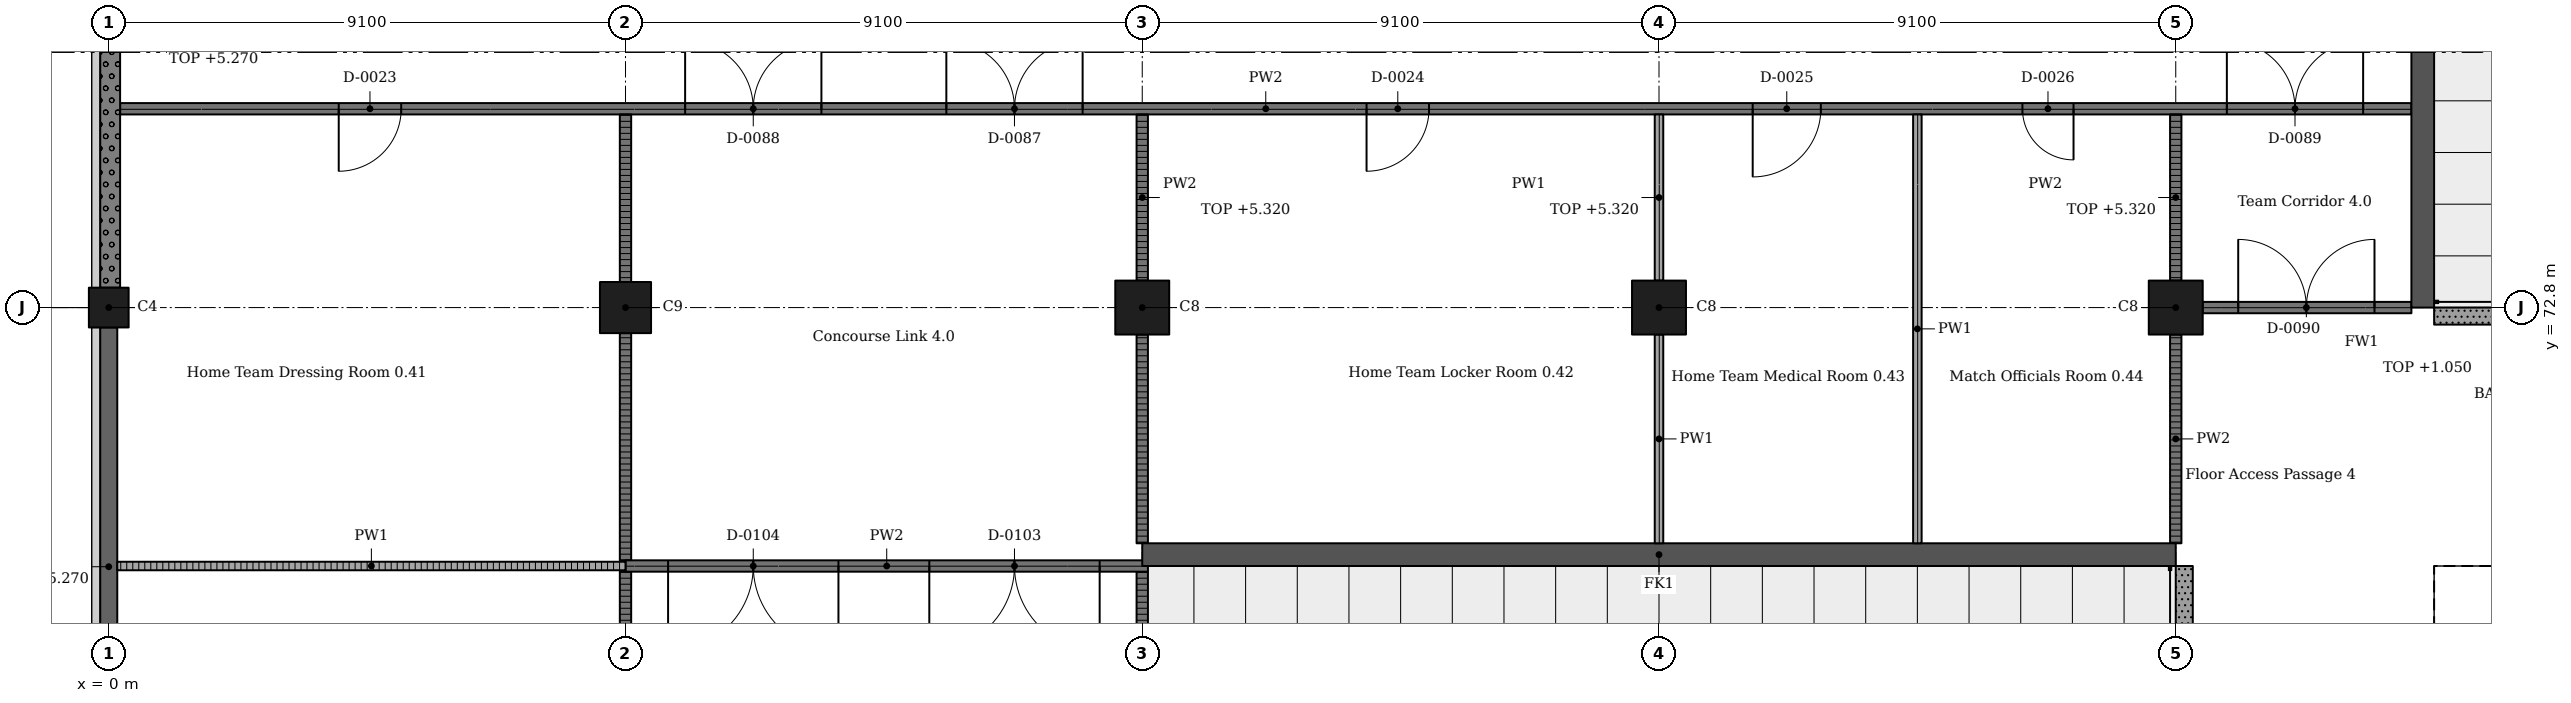
"""IFC4 building model, lengths in metres.
Left out: names, types, materials, properties, quantities, classifications, styles, units other than length and angle.
Written with IfcOpenShell. Run it as: python <this file> out.ifc"""

import sys

from ifc_helpers import new_model, si_unit, direction, frame, frame_2d, origin, origin_2d, place, context, subcontext, project, spatial, rectangle, extrude, element, fill, save


model = new_model("IFC4")
c1 = context("Model", 3, precision=1e-05, world=origin(), true_north=direction((0.0, 1.0)))
c2 = subcontext(c1, "Body", "Model", "MODEL_VIEW")
j1 = project(units=[si_unit("LENGTHUNIT", "METRE"), si_unit("PLANEANGLEUNIT", "RADIAN")], contexts=[c1])
p1 = place(None, origin())
s1 = spatial("IfcSite", under=j1, at=p1, CompositionType="ELEMENT")
p2 = place(p1, origin())
s2 = spatial("IfcBuilding", under=s1, at=p2, CompositionType="ELEMENT")
p3 = place(p2, origin())
s3 = spatial("IfcBuildingStorey", under=s2, at=p3, CompositionType="ELEMENT", Elevation=0.0)
p4 = place(p3, frame((0.0, 72.8, -0.4), z_axis=(0.0, 0.0, 1.0), x_axis=(1.0, 0.0, 0.0)))
e1 = element("IfcColumn", 1, at=p4, inside=s3, PredefinedType="COLUMN", context=c2, shape_type="SweptSolid", body=[
    extrude(rectangle(XDim=0.7, YDim=0.7, at=origin_2d()), origin(), (0.0, 0.0, 1.0), 6.77),
])
p5 = place(p3, frame((9.1, 72.8, -0.4), z_axis=(0.0, 0.0, 1.0), x_axis=(1.0, 0.0, 0.0)))
e2 = element("IfcColumn", 2, at=p5, inside=s3, PredefinedType="COLUMN", context=c2, shape_type="SweptSolid", body=[
    extrude(rectangle(XDim=0.9, YDim=0.9, at=origin_2d()), origin(), (0.0, 0.0, 1.0), 6.77),
])
for number, where, z_axis, x_axis in (
    (3, (18.2, 72.8, -0.4), (0.0, 0.0, 1.0), (1.0, 0.0, 0.0)),
    (4, (27.3, 72.8, -0.4), (0.0, 0.0, 1.0), (1.0, 0.0, 0.0)),
    (5, (36.4, 72.8, -0.4), (0.0, 0.0, 1.0), (1.0, 0.0, 0.0)),
):
    element("IfcColumn", number, at=place(p3, frame(where, z_axis=z_axis, x_axis=x_axis)), inside=s3, PredefinedType="COLUMN", context=c2, shape_type="SweptSolid", body=[
        extrude(rectangle(XDim=0.95, YDim=0.95, at=origin_2d()), origin(), (0.0, 0.0, 1.0), 6.77),
    ])
p6 = place(p3, frame((40.95, 72.65, -0.4), z_axis=(0.0, 0.0, 1.0), x_axis=(1.0, 0.0, 0.0)))
e6 = element("IfcWall", 6, at=p6, inside=s3, PredefinedType="SOLIDWALL", context=c2, shape_type="SweptSolid", body=[
    extrude(rectangle(XDim=63.7, YDim=0.3, at=frame_2d((31.85, 0.0))), origin(), (0.0, 0.0, 1.0), 1.45),
])
p7 = place(p3, frame((36.55, 40.95, -0.4), z_axis=(0.0, 0.0, 1.0), x_axis=(0.0, 1.0, 0.0)))
e7 = element("IfcWall", 7, at=p7, inside=s3, PredefinedType="SOLIDWALL", context=c2, shape_type="SweptSolid", body=[
    extrude(rectangle(XDim=27.3, YDim=0.3, at=frame_2d((13.65, 0.0))), origin(), (0.0, 0.0, 1.0), 1.45),
])
for number, where, z_axis, x_axis in (
    (8, (40.75, 72.8, -0.4), (0.0, 0.0, 1.0), (0.0, 1.0, 0.0)),
    (9, (36.4, 68.45, -0.4), (0.0, 0.0, 1.0), (-1.0, 0.0, 0.0)),
):
    element("IfcWall", number, at=place(p3, frame(where, z_axis=z_axis, x_axis=x_axis)), inside=s3, PredefinedType="SHEAR", context=c2, shape_type="SweptSolid", body=[
        extrude(rectangle(XDim=18.2, YDim=0.4, at=frame_2d((9.1, 0.0))), origin(), (0.0, 0.0, 1.0), 6.77),
    ])
p8 = place(p3, frame((0.025, 81.65, 0.0), z_axis=(0.0, 0.0, 1.0), x_axis=(0.0, -1.0, 0.0)))
e10 = element("IfcWall", 10, at=p8, inside=s3, PredefinedType="SOLIDWALL", context=c2, shape_type="SweptSolid", body=[
    extrude(rectangle(XDim=8.5, YDim=0.35, at=frame_2d((4.25, 0.0))), origin(), (0.0, 0.0, 1.0), 5.27),
])
p9 = place(p3, frame((0.0, 72.45, 0.0), z_axis=(0.0, 0.0, 1.0), x_axis=(0.0, -1.0, 0.0)))
e11 = element("IfcWall", 11, at=p9, inside=s3, PredefinedType="SOLIDWALL", context=c2, shape_type="SweptSolid", body=[
    extrude(rectangle(XDim=8.425, YDim=0.3, at=frame_2d((4.212, 0.0))), origin(), (0.0, 0.0, 1.0), 5.27),
])
p10 = place(p3, frame((0.2, 76.3, 0.0), z_axis=(0.0, 0.0, 1.0), x_axis=(1.0, 0.0, 0.0)))
e12 = element("IfcWall", 12, at=p10, inside=s3, PredefinedType="PARTITIONING", context=c2, shape_type="SweptSolid", body=[
    extrude(rectangle(XDim=40.35, YDim=0.2, at=frame_2d((20.175, 0.0))), origin(), (0.0, 0.0, 1.0), 6.02),
])
p11 = place(p10, frame((3.85, 0.0, 0.0)))
e13 = element("IfcOpeningElement", 13, at=p11, cuts=e12, PredefinedType="OPENING", context=c2, shape_type="SweptSolid", body=[
    extrude(rectangle(XDim=1.1, YDim=2.1, at=frame_2d((0.55, 1.05))), frame((0.0, 0.11, 0.0), z_axis=(0.0, -1.0, 0.0), x_axis=(1.0, 0.0, 0.0)), (0.0, 0.0, 1.0), 0.22),
])
p12 = place(p10, frame((21.95, 0.0, 0.0)))
e14 = element("IfcOpeningElement", 14, at=p12, cuts=e12, PredefinedType="OPENING", context=c2, shape_type="SweptSolid", body=[
    extrude(rectangle(XDim=1.1, YDim=2.1, at=frame_2d((0.55, 1.05))), frame((0.0, 0.11, 0.0), z_axis=(0.0, -1.0, 0.0), x_axis=(1.0, 0.0, 0.0)), (0.0, 0.0, 1.0), 0.22),
])
p13 = place(p10, frame((28.75, 0.0, 0.0)))
e15 = element("IfcOpeningElement", 15, at=p13, cuts=e12, PredefinedType="OPENING", context=c2, shape_type="SweptSolid", body=[
    extrude(rectangle(XDim=1.2, YDim=2.1, at=frame_2d((0.6, 1.05))), frame((0.0, 0.11, 0.0), z_axis=(0.0, -1.0, 0.0), x_axis=(1.0, 0.0, 0.0)), (0.0, 0.0, 1.0), 0.22),
])
p14 = place(p10, frame((33.5, 0.0, 0.0)))
e16 = element("IfcOpeningElement", 16, at=p14, cuts=e12, PredefinedType="OPENING", context=c2, shape_type="SweptSolid", body=[
    extrude(rectangle(XDim=0.9, YDim=2.0, at=frame_2d((0.45, 1.0))), frame((0.0, 0.11, 0.0), z_axis=(0.0, -1.0, 0.0), x_axis=(1.0, 0.0, 0.0)), (0.0, 0.0, 1.0), 0.22),
])
p15 = place(p10, frame((14.55, 0.0, 0.0)))
e17 = element("IfcOpeningElement", 17, at=p15, cuts=e12, PredefinedType="OPENING", context=c2, shape_type="SweptSolid", body=[
    extrude(rectangle(XDim=2.4, YDim=2.4, at=frame_2d((1.2, 1.2))), frame((0.0, 0.11, 0.0), z_axis=(0.0, -1.0, 0.0), x_axis=(1.0, 0.0, 0.0)), (0.0, 0.0, 1.0), 0.22),
])
p16 = place(p10, frame((9.95, 0.0, 0.0)))
e18 = element("IfcOpeningElement", 18, at=p16, cuts=e12, PredefinedType="OPENING", context=c2, shape_type="SweptSolid", body=[
    extrude(rectangle(XDim=2.4, YDim=2.4, at=frame_2d((1.2, 1.2))), frame((0.0, 0.11, 0.0), z_axis=(0.0, -1.0, 0.0), x_axis=(1.0, 0.0, 0.0)), (0.0, 0.0, 1.0), 0.22),
])
p17 = place(p10, frame((37.1, 0.0, 0.0)))
e19 = element("IfcOpeningElement", 19, at=p17, cuts=e12, PredefinedType="OPENING", context=c2, shape_type="SweptSolid", body=[
    extrude(rectangle(XDim=2.4, YDim=2.4, at=frame_2d((1.2, 1.2))), frame((0.0, 0.11, 0.0), z_axis=(0.0, -1.0, 0.0), x_axis=(1.0, 0.0, 0.0)), (0.0, 0.0, 1.0), 0.22),
])
p18 = place(p3, frame((9.1, 64.125, 0.0), z_axis=(0.0, 0.0, 1.0), x_axis=(0.0, 1.0, 0.0)))
e20 = element("IfcWall", 20, at=p18, inside=s3, PredefinedType="PARTITIONING", context=c2, shape_type="SweptSolid", body=[
    extrude(rectangle(XDim=4.025, YDim=0.2, at=frame_2d((2.012, 0.0))), origin(), (0.0, 0.0, 1.0), 5.32),
])
p19 = place(p18, frame((1.45, 0.0, 0.0)))
e21 = element("IfcOpeningElement", 21, at=p19, cuts=e20, PredefinedType="OPENING", context=c2, shape_type="SweptSolid", body=[
    extrude(rectangle(XDim=1.2, YDim=2.1, at=frame_2d((0.6, 1.05))), frame((0.0, 0.11, 0.0), z_axis=(0.0, -1.0, 0.0), x_axis=(1.0, 0.0, 0.0)), (0.0, 0.0, 1.0), 0.22),
])
p20 = place(p3, frame((9.1, 68.25, 0.0), z_axis=(0.0, 0.0, 1.0), x_axis=(-1.0, 0.0, 0.0)))
e22 = element("IfcWall", 22, at=p20, inside=s3, PredefinedType="PARTITIONING", context=c2, shape_type="SweptSolid", body=[
    extrude(rectangle(XDim=8.95, YDim=0.15, at=frame_2d((4.475, 0.0))), origin(), (0.0, 0.0, 1.0), 6.02),
])
p21 = place(p3, frame((9.1, 72.35, 0.0), z_axis=(0.0, 0.0, 1.0), x_axis=(0.0, -1.0, 0.0)))
e23 = element("IfcWall", 23, at=p21, inside=s3, PredefinedType="PARTITIONING", context=c2, shape_type="SweptSolid", body=[
    extrude(rectangle(XDim=4.0, YDim=0.2, at=frame_2d((2.0, 0.0))), origin(), (0.0, 0.0, 1.0), 5.32),
])
p22 = place(p3, frame((9.1, 76.2, 0.0), z_axis=(0.0, 0.0, 1.0), x_axis=(0.0, -1.0, 0.0)))
e24 = element("IfcWall", 24, at=p22, inside=s3, PredefinedType="PARTITIONING", context=c2, shape_type="SweptSolid", body=[
    extrude(rectangle(XDim=2.95, YDim=0.2, at=frame_2d((1.475, 0.0))), origin(), (0.0, 0.0, 1.0), 5.32),
])
p23 = place(p3, frame((18.2, 68.15, 0.0), z_axis=(0.0, 0.0, 1.0), x_axis=(0.0, -1.0, 0.0)))
e25 = element("IfcWall", 25, at=p23, inside=s3, PredefinedType="PARTITIONING", context=c2, shape_type="SweptSolid", body=[
    extrude(rectangle(XDim=4.15, YDim=0.2, at=frame_2d((2.075, 0.0))), origin(), (0.0, 0.0, 1.0), 5.02),
])
p24 = place(p3, frame((18.2, 68.65, 0.0), z_axis=(0.0, 0.0, 1.0), x_axis=(0.0, 1.0, 0.0)))
e26 = element("IfcWall", 26, at=p24, inside=s3, PredefinedType="PARTITIONING", context=c2, shape_type="SweptSolid", body=[
    extrude(rectangle(XDim=3.675, YDim=0.2, at=frame_2d((1.837, 0.0))), origin(), (0.0, 0.0, 1.0), 5.02),
])
p25 = place(p3, frame((18.2, 73.275, 0.0), z_axis=(0.0, 0.0, 1.0), x_axis=(0.0, 1.0, 0.0)))
e27 = element("IfcWall", 27, at=p25, inside=s3, PredefinedType="PARTITIONING", context=c2, shape_type="SweptSolid", body=[
    extrude(rectangle(XDim=2.925, YDim=0.2, at=frame_2d((1.462, 0.0))), origin(), (0.0, 0.0, 1.0), 5.32),
])
p26 = place(p3, frame((18.3, 68.25, 0.0), z_axis=(0.0, 0.0, 1.0), x_axis=(-1.0, 0.0, 0.0)))
e28 = element("IfcWall", 28, at=p26, inside=s3, PredefinedType="PARTITIONING", context=c2, shape_type="SweptSolid", body=[
    extrude(rectangle(XDim=9.2, YDim=0.2, at=frame_2d((4.6, 0.0))), origin(), (0.0, 0.0, 1.0), 6.02),
])
p27 = place(p26, frame((0.85, 0.0, 0.0)))
e29 = element("IfcOpeningElement", 29, at=p27, cuts=e28, PredefinedType="OPENING", context=c2, shape_type="SweptSolid", body=[
    extrude(rectangle(XDim=3.0, YDim=2.4, at=frame_2d((1.5, 1.2))), frame((0.0, 0.11, 0.0), z_axis=(0.0, -1.0, 0.0), x_axis=(1.0, 0.0, 0.0)), (0.0, 0.0, 1.0), 0.22),
])
p28 = place(p26, frame((5.45, 0.0, 0.0)))
e30 = element("IfcOpeningElement", 30, at=p28, cuts=e28, PredefinedType="OPENING", context=c2, shape_type="SweptSolid", body=[
    extrude(rectangle(XDim=3.0, YDim=2.4, at=frame_2d((1.5, 1.2))), frame((0.0, 0.11, 0.0), z_axis=(0.0, -1.0, 0.0), x_axis=(1.0, 0.0, 0.0)), (0.0, 0.0, 1.0), 0.22),
])
p29 = place(p3, frame((27.3, 72.325, 0.0), z_axis=(0.0, 0.0, 1.0), x_axis=(0.0, -1.0, 0.0)))
e31 = element("IfcWall", 31, at=p29, inside=s3, PredefinedType="PARTITIONING", context=c2, shape_type="SweptSolid", body=[
    extrude(rectangle(XDim=3.675, YDim=0.15, at=frame_2d((1.837, 0.0))), origin(), (0.0, 0.0, 1.0), 6.02),
])
p30 = place(p3, frame((27.3, 76.2, 0.0), z_axis=(0.0, 0.0, 1.0), x_axis=(0.0, -1.0, 0.0)))
e32 = element("IfcWall", 32, at=p30, inside=s3, PredefinedType="PARTITIONING", context=c2, shape_type="SweptSolid", body=[
    extrude(rectangle(XDim=2.925, YDim=0.15, at=frame_2d((1.462, 0.0))), origin(), (0.0, 0.0, 1.0), 5.32),
])
p31 = place(p3, frame((31.85, 76.2, 0.0), z_axis=(0.0, 0.0, 1.0), x_axis=(0.0, -1.0, 0.0)))
e33 = element("IfcWall", 33, at=p31, inside=s3, PredefinedType="PARTITIONING", context=c2, shape_type="SweptSolid", body=[
    extrude(rectangle(XDim=7.55, YDim=0.15, at=frame_2d((3.775, 0.0))), origin(), (0.0, 0.0, 1.0), 6.02),
])
p32 = place(p3, frame((36.4, 72.325, 0.0), z_axis=(0.0, 0.0, 1.0), x_axis=(0.0, -1.0, 0.0)))
e34 = element("IfcWall", 34, at=p32, inside=s3, PredefinedType="PARTITIONING", context=c2, shape_type="SweptSolid", body=[
    extrude(rectangle(XDim=3.675, YDim=0.2, at=frame_2d((1.837, 0.0))), origin(), (0.0, 0.0, 1.0), 6.02),
])
p33 = place(p3, frame((36.4, 76.2, 0.0), z_axis=(0.0, 0.0, 1.0), x_axis=(0.0, -1.0, 0.0)))
e35 = element("IfcWall", 35, at=p33, inside=s3, PredefinedType="PARTITIONING", context=c2, shape_type="SweptSolid", body=[
    extrude(rectangle(XDim=2.925, YDim=0.2, at=frame_2d((1.462, 0.0))), origin(), (0.0, 0.0, 1.0), 5.32),
])
p34 = place(p3, frame((40.55, 72.8, 0.0), z_axis=(0.0, 0.0, 1.0), x_axis=(-1.0, 0.0, 0.0)))
e36 = element("IfcWall", 36, at=p34, inside=s3, PredefinedType="PARTITIONING", context=c2, shape_type="SweptSolid", body=[
    extrude(rectangle(XDim=3.675, YDim=0.2, at=frame_2d((1.837, 0.0))), origin(), (0.0, 0.0, 1.0), 6.02),
])
p35 = place(p34, frame((0.65, 0.0, 0.0)))
e37 = element("IfcOpeningElement", 37, at=p35, cuts=e36, PredefinedType="OPENING", context=c2, shape_type="SweptSolid", body=[
    extrude(rectangle(XDim=2.4, YDim=2.4, at=frame_2d((1.2, 1.2))), frame((0.0, 0.11, 0.0), z_axis=(0.0, -1.0, 0.0), x_axis=(1.0, 0.0, 0.0)), (0.0, 0.0, 1.0), 0.22),
])
p36 = place(p11, origin())
e38 = element("IfcDoor", 38, at=p36, inside=s3, OperationType="SINGLE_SWING_LEFT", PredefinedType="DOOR", context=c2, shape_type="SweptSolid", body=[
    extrude(rectangle(XDim=1.1, YDim=2.1, at=frame_2d((0.55, 1.05))), frame((0.0, 0.025, 0.0), z_axis=(0.0, -1.0, 0.0), x_axis=(1.0, 0.0, 0.0)), (0.0, 0.0, 1.0), 0.05),
])
fill(e13, e38)
p37 = place(p12, origin())
e39 = element("IfcDoor", 39, at=p37, inside=s3, OperationType="SINGLE_SWING_LEFT", PredefinedType="DOOR", context=c2, shape_type="SweptSolid", body=[
    extrude(rectangle(XDim=1.1, YDim=2.1, at=frame_2d((0.55, 1.05))), frame((0.0, 0.025, 0.0), z_axis=(0.0, -1.0, 0.0), x_axis=(1.0, 0.0, 0.0)), (0.0, 0.0, 1.0), 0.05),
])
fill(e14, e39)
p38 = place(p13, origin())
e40 = element("IfcDoor", 40, at=p38, inside=s3, OperationType="SINGLE_SWING_LEFT", PredefinedType="DOOR", context=c2, shape_type="SweptSolid", body=[
    extrude(rectangle(XDim=1.2, YDim=2.1, at=frame_2d((0.6, 1.05))), frame((0.0, 0.025, 0.0), z_axis=(0.0, -1.0, 0.0), x_axis=(1.0, 0.0, 0.0)), (0.0, 0.0, 1.0), 0.05),
])
fill(e15, e40)
p39 = place(p14, origin())
e41 = element("IfcDoor", 41, at=p39, inside=s3, OperationType="SINGLE_SWING_RIGHT", PredefinedType="DOOR", context=c2, shape_type="SweptSolid", body=[
    extrude(rectangle(XDim=0.9, YDim=2.0, at=frame_2d((0.45, 1.0))), frame((0.0, 0.025, 0.0), z_axis=(0.0, -1.0, 0.0), x_axis=(1.0, 0.0, 0.0)), (0.0, 0.0, 1.0), 0.05),
])
fill(e16, e41)
p40 = place(p15, origin())
e42 = element("IfcDoor", 42, at=p40, inside=s3, OperationType="DOUBLE_DOOR_SINGLE_SWING", PredefinedType="DOOR", context=c2, shape_type="SweptSolid", body=[
    extrude(rectangle(XDim=2.4, YDim=2.4, at=frame_2d((1.2, 1.2))), frame((0.0, 0.025, 0.0), z_axis=(0.0, -1.0, 0.0), x_axis=(1.0, 0.0, 0.0)), (0.0, 0.0, 1.0), 0.05),
])
fill(e17, e42)
p41 = place(p16, origin())
e43 = element("IfcDoor", 43, at=p41, inside=s3, OperationType="DOUBLE_DOOR_SINGLE_SWING", PredefinedType="DOOR", context=c2, shape_type="SweptSolid", body=[
    extrude(rectangle(XDim=2.4, YDim=2.4, at=frame_2d((1.2, 1.2))), frame((0.0, 0.025, 0.0), z_axis=(0.0, -1.0, 0.0), x_axis=(1.0, 0.0, 0.0)), (0.0, 0.0, 1.0), 0.05),
])
fill(e18, e43)
p42 = place(p17, origin())
e44 = element("IfcDoor", 44, at=p42, inside=s3, OperationType="DOUBLE_DOOR_SINGLE_SWING", PredefinedType="DOOR", context=c2, shape_type="SweptSolid", body=[
    extrude(rectangle(XDim=2.4, YDim=2.4, at=frame_2d((1.2, 1.2))), frame((0.0, 0.025, 0.0), z_axis=(0.0, -1.0, 0.0), x_axis=(1.0, 0.0, 0.0)), (0.0, 0.0, 1.0), 0.05),
])
fill(e19, e44)
p43 = place(p35, origin())
e45 = element("IfcDoor", 45, at=p43, inside=s3, OperationType="DOUBLE_DOOR_SINGLE_SWING", PredefinedType="DOOR", context=c2, shape_type="SweptSolid", body=[
    extrude(rectangle(XDim=2.4, YDim=2.4, at=frame_2d((1.2, 1.2))), frame((0.0, 0.025, 0.0), z_axis=(0.0, -1.0, 0.0), x_axis=(1.0, 0.0, 0.0)), (0.0, 0.0, 1.0), 0.05),
])
fill(e37, e45)
p44 = place(p27, origin())
e46 = element("IfcDoor", 46, at=p44, inside=s3, OperationType="DOUBLE_DOOR_SINGLE_SWING", PredefinedType="DOOR", context=c2, shape_type="SweptSolid", body=[
    extrude(rectangle(XDim=3.0, YDim=2.4, at=frame_2d((1.5, 1.2))), frame((0.0, 0.025, 0.0), z_axis=(0.0, -1.0, 0.0), x_axis=(1.0, 0.0, 0.0)), (0.0, 0.0, 1.0), 0.05),
])
fill(e29, e46)
p45 = place(p28, origin())
e47 = element("IfcDoor", 47, at=p45, inside=s3, OperationType="DOUBLE_DOOR_SINGLE_SWING", PredefinedType="DOOR", context=c2, shape_type="SweptSolid", body=[
    extrude(rectangle(XDim=3.0, YDim=2.4, at=frame_2d((1.5, 1.2))), frame((0.0, 0.025, 0.0), z_axis=(0.0, -1.0, 0.0), x_axis=(1.0, 0.0, 0.0)), (0.0, 0.0, 1.0), 0.05),
])
fill(e30, e47)
save(model, sys.argv[1])
